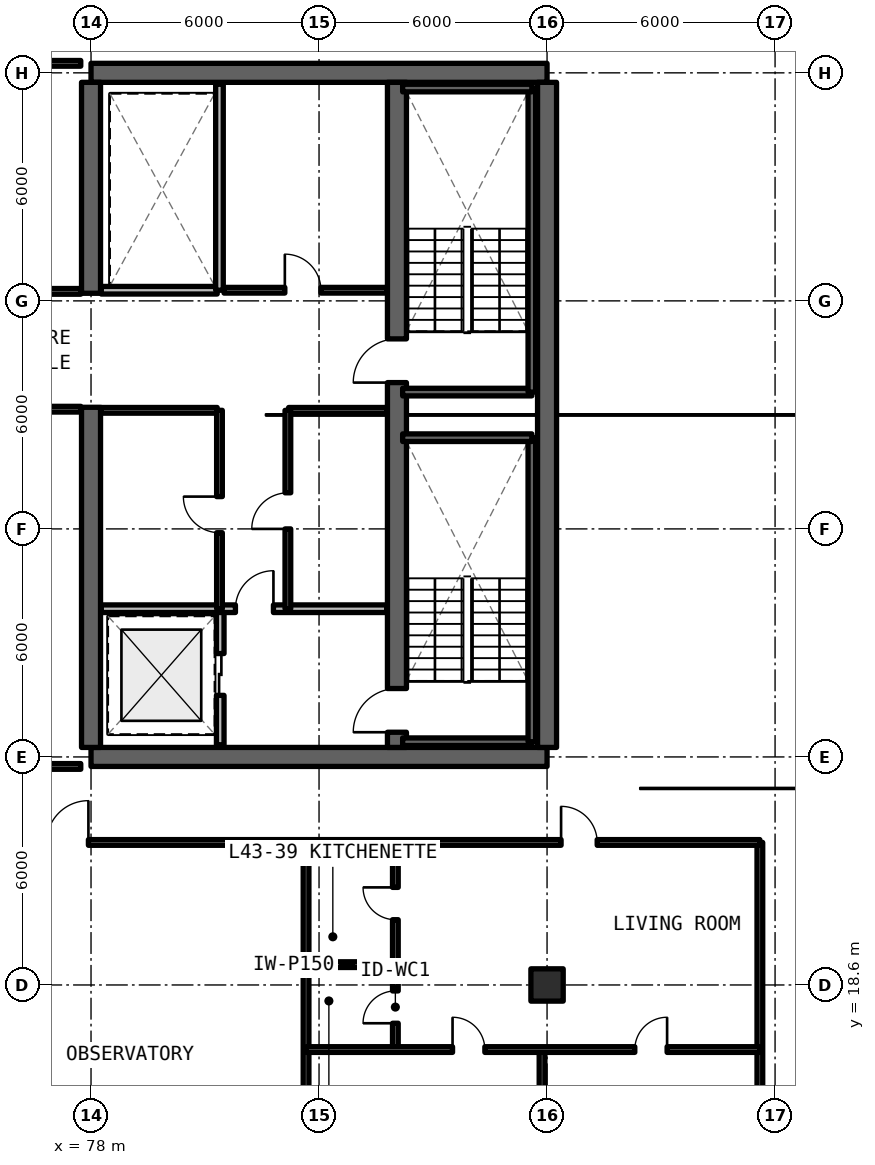
"""IFC4 building model, lengths in metres.
Left out: names, types, materials, properties, quantities, classifications, styles, units other than length and angle.
Written with IfcOpenShell. Run it as: python <this file> out.ifc"""

import sys

from ifc_helpers import new_model, si_unit, direction, frame, frame_2d, origin, origin_2d, place, context, subcontext, project, spatial, rectangle, extrude, element, fill, save


model = new_model("IFC4")
c1 = context("Model", 3, precision=1e-05, world=origin(), true_north=direction((0.0, 1.0)))
c2 = subcontext(c1, "Body", "Model", "MODEL_VIEW")
j1 = project(units=[si_unit("LENGTHUNIT", "METRE"), si_unit("PLANEANGLEUNIT", "RADIAN")], contexts=[c1])
p1 = place(None, origin())
s1 = spatial("IfcSite", under=j1, at=p1, CompositionType="ELEMENT")
p2 = place(p1, origin())
s2 = spatial("IfcBuilding", under=s1, at=p2, CompositionType="ELEMENT")
p3 = place(p2, frame((0.0, 0.0, 155.1)))
s3 = spatial("IfcBuildingStorey", under=s2, at=p3, CompositionType="ELEMENT", Elevation=155.1)
for number, where, z_axis, x_axis in (
    (1, (78.0, 24.6, 0.0), (0.0, 0.0, 1.0), (1.0, 0.0, 0.0)),
    (2, (90.0, 42.6, 0.0), (0.0, 0.0, 1.0), (-1.0, 0.0, 0.0)),
):
    element("IfcWall", number, at=place(p3, frame(where, z_axis=z_axis, x_axis=x_axis)), inside=s3, PredefinedType="SHEAR", context=c2, shape_type="SweptSolid", body=[
        extrude(rectangle(XDim=12.0, YDim=0.5, at=frame_2d((6.0, 0.0))), origin(), (0.0, 0.0, 1.0), 3.3),
    ])
p4 = place(p3, frame((90.0, 24.85, 0.0), z_axis=(0.0, 0.0, 1.0), x_axis=(0.0, 1.0, 0.0)))
e3 = element("IfcWall", 3, at=p4, inside=s3, PredefinedType="SHEAR", context=c2, shape_type="SweptSolid", body=[
    extrude(rectangle(XDim=17.5, YDim=0.5, at=frame_2d((8.75, 0.0))), origin(), (0.0, 0.0, 1.0), 3.3),
])
p5 = place(p3, frame((78.0, 24.85, 0.0), z_axis=(0.0, 0.0, 1.0), x_axis=(0.0, 1.0, 0.0)))
e4 = element("IfcWall", 4, at=p5, inside=s3, PredefinedType="SHEAR", context=c2, shape_type="SweptSolid", body=[
    extrude(rectangle(XDim=8.95, YDim=0.5, at=frame_2d((4.475, 0.0))), origin(), (0.0, 0.0, 1.0), 3.3),
])
p6 = place(p3, frame((78.0, 36.8, 0.0), z_axis=(0.0, 0.0, 1.0), x_axis=(0.0, 1.0, 0.0)))
e5 = element("IfcWall", 5, at=p6, inside=s3, PredefinedType="SHEAR", context=c2, shape_type="SweptSolid", body=[
    extrude(rectangle(XDim=5.55, YDim=0.5, at=frame_2d((2.775, 0.0))), origin(), (0.0, 0.0, 1.0), 3.3),
])
p7 = place(p3, frame((86.05, 24.85, 0.0), z_axis=(0.0, 0.0, 1.0), x_axis=(0.0, 1.0, 0.0)))
e6 = element("IfcWall", 6, at=p7, inside=s3, PredefinedType="SHEAR", context=c2, shape_type="SweptSolid", body=[
    extrude(rectangle(XDim=17.5, YDim=0.5, at=frame_2d((8.75, 0.0))), origin(), (0.0, 0.0, 1.0), 3.3),
])
p8 = place(p7, frame((0.4, 0.0, 0.0)))
e7 = element("IfcOpeningElement", 7, at=p8, cuts=e6, PredefinedType="OPENING", context=c2, shape_type="SweptSolid", body=[
    extrude(rectangle(XDim=1.15, YDim=2.15, at=frame_2d((0.575, 1.075))), frame((0.0, 0.26, 0.0), z_axis=(0.0, -1.0, 0.0), x_axis=(1.0, 0.0, 0.0)), (0.0, 0.0, 1.0), 0.52),
])
p9 = place(p7, frame((9.6, 0.0, 0.0)))
e8 = element("IfcOpeningElement", 8, at=p9, cuts=e6, PredefinedType="OPENING", context=c2, shape_type="SweptSolid", body=[
    extrude(rectangle(XDim=1.15, YDim=2.15, at=frame_2d((0.575, 1.075))), frame((0.0, 0.26, 0.0), z_axis=(0.0, -1.0, 0.0), x_axis=(1.0, 0.0, 0.0)), (0.0, 0.0, 1.0), 0.52),
])
p10 = place(p3, frame((90.0, 18.6, 0.0), z_axis=(0.0, 0.0, 1.0), x_axis=(1.0, 0.0, 0.0)))
e9 = element("IfcColumn", 9, at=p10, inside=s3, PredefinedType="COLUMN", context=c2, shape_type="SweptSolid", body=[
    extrude(rectangle(XDim=0.85, YDim=0.85, at=origin_2d()), origin(), (0.0, 0.0, 1.0), 3.3),
])
p11 = place(p3, frame((95.748, 12.025, 0.0), z_axis=(0.0, 0.0, 1.0), x_axis=(0.70708586489, 0.707127696864, 0.0)))
e10 = element("IfcWall", 10, at=p11, inside=s3, PredefinedType="SOLIDWALL", context=c2, shape_type="SweptSolid", body=[
    extrude(rectangle(XDim=5.836, YDim=0.25, at=frame_2d((2.918, 0.0))), origin(), (0.0, 0.0, 1.0), 3.08),
])
p12 = place(p11, frame((1.218, 0.0, 0.78)))
e11 = element("IfcOpeningElement", 11, at=p12, cuts=e10, PredefinedType="OPENING", context=c2, shape_type="SweptSolid", body=[
    extrude(rectangle(XDim=3.4, YDim=1.66, at=frame_2d((1.7, 0.83))), frame((0.0, 0.135, 0.0), z_axis=(0.0, -1.0, 0.0), x_axis=(1.0, 0.0, 0.0)), (0.0, 0.0, 1.0), 0.27),
])
p13 = place(p3, frame((81.4, 24.92, 0.0), z_axis=(0.0, 0.0, 1.0), x_axis=(0.0, 1.0, 0.0)))
e12 = element("IfcWall", 12, at=p13, inside=s3, PredefinedType="SOLIDWALL", context=c2, shape_type="SweptSolid", body=[
    extrude(rectangle(XDim=3.58, YDim=0.2, at=frame_2d((1.79, 0.0))), origin(), (0.0, 0.0, 1.0), 2.35),
])
p14 = place(p13, frame((1.3, 0.0, 0.0)))
e13 = element("IfcOpeningElement", 13, at=p14, cuts=e12, PredefinedType="OPENING", context=c2, shape_type="SweptSolid", body=[
    extrude(rectangle(XDim=1.1, YDim=2.2, at=frame_2d((0.55, 1.1))), frame((0.0, 0.11, 0.0), z_axis=(0.0, -1.0, 0.0), x_axis=(1.0, 0.0, 0.0)), (0.0, 0.0, 1.0), 0.22),
])
p15 = place(p3, frame((78.27, 28.5, 0.0), z_axis=(0.0, 0.0, 1.0), x_axis=(1.0, 0.0, 0.0)))
e14 = element("IfcWall", 14, at=p15, inside=s3, PredefinedType="SOLIDWALL", context=c2, shape_type="SweptSolid", body=[
    extrude(rectangle(XDim=7.51, YDim=0.2, at=frame_2d((3.755, 0.0))), origin(), (0.0, 0.0, 1.0), 2.35),
])
p16 = place(p15, frame((3.53, 0.0, 0.0)))
e15 = element("IfcOpeningElement", 15, at=p16, cuts=e14, PredefinedType="OPENING", context=c2, shape_type="SweptSolid", body=[
    extrude(rectangle(XDim=1.0, YDim=2.15, at=frame_2d((0.5, 1.075))), frame((0.0, 0.11, 0.0), z_axis=(0.0, -1.0, 0.0), x_axis=(1.0, 0.0, 0.0)), (0.0, 0.0, 1.0), 0.22),
])
p17 = place(p3, frame((83.2, 33.72, 0.0), z_axis=(0.0, 0.0, 1.0), x_axis=(1.0, 0.0, 0.0)))
e16 = element("IfcWall", 16, at=p17, inside=s3, PredefinedType="SOLIDWALL", context=c2, shape_type="SweptSolid", body=[
    extrude(rectangle(XDim=2.58, YDim=0.15, at=frame_2d((1.29, 0.0))), origin(), (0.0, 0.0, 1.0), 2.35),
])
p18 = place(p3, frame((83.18, 28.5, 0.0), z_axis=(0.0, 0.0, 1.0), x_axis=(0.0, 1.0, 0.0)))
e17 = element("IfcWall", 17, at=p18, inside=s3, PredefinedType="SOLIDWALL", context=c2, shape_type="SweptSolid", body=[
    extrude(rectangle(XDim=5.22, YDim=0.15, at=frame_2d((2.61, 0.0))), origin(), (0.0, 0.0, 1.0), 2.35),
])
p19 = place(p18, frame((2.1, 0.0, 0.0)))
e18 = element("IfcOpeningElement", 18, at=p19, cuts=e17, PredefinedType="OPENING", context=c2, shape_type="SweptSolid", body=[
    extrude(rectangle(XDim=0.95, YDim=2.15, at=frame_2d((0.475, 1.075))), frame((0.0, 0.085, 0.0), z_axis=(0.0, -1.0, 0.0), x_axis=(1.0, 0.0, 0.0)), (0.0, 0.0, 1.0), 0.17),
])
p20 = place(p3, frame((78.27, 33.72, 0.0), z_axis=(0.0, 0.0, 1.0), x_axis=(1.0, 0.0, 0.0)))
e19 = element("IfcWall", 19, at=p20, inside=s3, PredefinedType="SOLIDWALL", context=c2, shape_type="SweptSolid", body=[
    extrude(rectangle(XDim=3.05, YDim=0.15, at=frame_2d((1.525, 0.0))), origin(), (0.0, 0.0, 1.0), 2.35),
])
p21 = place(p3, frame((81.38, 28.5, 0.0), z_axis=(0.0, 0.0, 1.0), x_axis=(0.0, 1.0, 0.0)))
e20 = element("IfcWall", 20, at=p21, inside=s3, PredefinedType="SOLIDWALL", context=c2, shape_type="SweptSolid", body=[
    extrude(rectangle(XDim=5.22, YDim=0.15, at=frame_2d((2.61, 0.0))), origin(), (0.0, 0.0, 1.0), 2.35),
])
p22 = place(p21, frame((2.0, 0.0, 0.0)))
e21 = element("IfcOpeningElement", 21, at=p22, cuts=e20, PredefinedType="OPENING", context=c2, shape_type="SweptSolid", body=[
    extrude(rectangle(XDim=0.95, YDim=2.15, at=frame_2d((0.475, 1.075))), frame((0.0, 0.085, 0.0), z_axis=(0.0, -1.0, 0.0), x_axis=(1.0, 0.0, 0.0)), (0.0, 0.0, 1.0), 0.17),
])
p23 = place(p3, frame((81.5, 36.88, 0.0), z_axis=(0.0, 0.0, 1.0), x_axis=(1.0, 0.0, 0.0)))
e22 = element("IfcWall", 22, at=p23, inside=s3, PredefinedType="SOLIDWALL", context=c2, shape_type="SweptSolid", body=[
    extrude(rectangle(XDim=4.28, YDim=0.15, at=frame_2d((2.14, 0.0))), origin(), (0.0, 0.0, 1.0), 2.35),
])
p24 = place(p23, frame((1.6, 0.0, 0.0)))
e23 = element("IfcOpeningElement", 23, at=p24, cuts=e22, PredefinedType="OPENING", context=c2, shape_type="SweptSolid", body=[
    extrude(rectangle(XDim=0.95, YDim=2.15, at=frame_2d((0.475, 1.075))), frame((0.0, 0.085, 0.0), z_axis=(0.0, -1.0, 0.0), x_axis=(1.0, 0.0, 0.0)), (0.0, 0.0, 1.0), 0.17),
])
p25 = place(p3, frame((78.27, 36.88, 0.0), z_axis=(0.0, 0.0, 1.0), x_axis=(1.0, 0.0, 0.0)))
e24 = element("IfcWall", 24, at=p25, inside=s3, PredefinedType="SOLIDWALL", context=c2, shape_type="SweptSolid", body=[
    extrude(rectangle(XDim=3.05, YDim=0.2, at=frame_2d((1.525, 0.0))), origin(), (0.0, 0.0, 1.0), 2.35),
])
p26 = place(p3, frame((81.38, 36.88, 0.0), z_axis=(0.0, 0.0, 1.0), x_axis=(0.0, 1.0, 0.0)))
e25 = element("IfcWall", 25, at=p26, inside=s3, PredefinedType="SOLIDWALL", context=c2, shape_type="SweptSolid", body=[
    extrude(rectangle(XDim=5.42, YDim=0.2, at=frame_2d((2.71, 0.0))), origin(), (0.0, 0.0, 1.0), 2.35),
])
p27 = place(p3, frame((69.85, 24.35, 0.0), z_axis=(0.0, 0.0, 1.0), x_axis=(1.0, 0.0, 0.0)))
e26 = element("IfcWall", 26, at=p27, inside=s3, PredefinedType="SOLIDWALL", context=c2, shape_type="SweptSolid", body=[
    extrude(rectangle(XDim=7.88, YDim=0.15, at=frame_2d((3.94, 0.0))), origin(), (0.0, 0.0, 1.0), 2.35),
])
p28 = place(p3, frame((69.85, 33.75, 0.0), z_axis=(0.0, 0.0, 1.0), x_axis=(1.0, 0.0, 0.0)))
e27 = element("IfcWall", 27, at=p28, inside=s3, PredefinedType="SOLIDWALL", context=c2, shape_type="SweptSolid", body=[
    extrude(rectangle(XDim=7.88, YDim=0.15, at=frame_2d((3.94, 0.0))), origin(), (0.0, 0.0, 1.0), 2.35),
])
p29 = place(p28, frame((3.465, 0.0, 0.0)))
e28 = element("IfcOpeningElement", 28, at=p29, cuts=e27, PredefinedType="OPENING", context=c2, shape_type="SweptSolid", body=[
    extrude(rectangle(XDim=0.95, YDim=2.15, at=frame_2d((0.475, 1.075))), frame((0.0, 0.085, 0.0), z_axis=(0.0, -1.0, 0.0), x_axis=(1.0, 0.0, 0.0)), (0.0, 0.0, 1.0), 0.17),
])
p30 = place(p3, frame((69.85, 36.85, 0.0), z_axis=(0.0, 0.0, 1.0), x_axis=(1.0, 0.0, 0.0)))
e29 = element("IfcWall", 29, at=p30, inside=s3, PredefinedType="SOLIDWALL", context=c2, shape_type="SweptSolid", body=[
    extrude(rectangle(XDim=7.88, YDim=0.15, at=frame_2d((3.94, 0.0))), origin(), (0.0, 0.0, 1.0), 2.35),
])
p31 = place(p30, frame((3.465, 0.0, 0.0)))
e30 = element("IfcOpeningElement", 30, at=p31, cuts=e29, PredefinedType="OPENING", context=c2, shape_type="SweptSolid", body=[
    extrude(rectangle(XDim=0.95, YDim=2.15, at=frame_2d((0.475, 1.075))), frame((0.0, 0.085, 0.0), z_axis=(0.0, -1.0, 0.0), x_axis=(1.0, 0.0, 0.0)), (0.0, 0.0, 1.0), 0.17),
])
p32 = place(p3, frame((69.85, 42.85, 0.0), z_axis=(0.0, 0.0, 1.0), x_axis=(1.0, 0.0, 0.0)))
e31 = element("IfcWall", 31, at=p32, inside=s3, PredefinedType="SOLIDWALL", context=c2, shape_type="SweptSolid", body=[
    extrude(rectangle(XDim=7.88, YDim=0.15, at=frame_2d((3.94, 0.0))), origin(), (0.0, 0.0, 1.0), 2.35),
])
for number, where, z_axis, x_axis in (
    (32, (95.6, 12.15, 0.0), (0.0, 0.0, 1.0), (0.0, 1.0, 0.0)),
    (33, (83.658, 12.15, 0.0), (0.0, 0.0, 1.0), (0.0, 1.0, 0.0)),
):
    element("IfcWall", number, at=place(p3, frame(where, z_axis=z_axis, x_axis=x_axis)), inside=s3, PredefinedType="SOLIDWALL", context=c2, shape_type="SweptSolid", body=[
        extrude(rectangle(XDim=10.2, YDim=0.15, at=frame_2d((5.1, 0.0))), origin(), (0.0, 0.0, 1.0), 2.35),
    ])
p33 = place(p3, frame((71.104, 22.35, 0.0), z_axis=(0.0, 0.0, 1.0), x_axis=(1.0, 0.0, 0.0)))
e34 = element("IfcWall", 34, at=p33, inside=s3, PredefinedType="SOLIDWALL", context=c2, shape_type="SweptSolid", body=[
    extrude(rectangle(XDim=12.554, YDim=0.15, at=frame_2d((6.277, 0.0))), origin(), (0.0, 0.0, 1.0), 2.35),
])
p34 = place(p33, frame((5.727, 0.0, 0.0)))
e35 = element("IfcOpeningElement", 35, at=p34, cuts=e34, PredefinedType="OPENING", context=c2, shape_type="SweptSolid", body=[
    extrude(rectangle(XDim=1.1, YDim=2.15, at=frame_2d((0.55, 1.075))), frame((0.0, 0.085, 0.0), z_axis=(0.0, -1.0, 0.0), x_axis=(1.0, 0.0, 0.0)), (0.0, 0.0, 1.0), 0.17),
])
p35 = place(p3, frame((83.658, 19.135, 0.0), z_axis=(0.0, 0.0, 1.0), x_axis=(1.0, 0.0, 0.0)))
e36 = element("IfcWall", 36, at=p35, inside=s3, PredefinedType="PARTITIONING", context=c2, shape_type="SweptSolid", body=[
    extrude(rectangle(XDim=2.35, YDim=0.15, at=frame_2d((1.175, 0.0))), origin(), (0.0, 0.0, 1.0), 2.35),
])
p36 = place(p3, frame((86.008, 16.901, 0.0), z_axis=(0.0, 0.0, 1.0), x_axis=(0.0, 1.0, 0.0)))
e37 = element("IfcWall", 37, at=p36, inside=s3, PredefinedType="PARTITIONING", context=c2, shape_type="SweptSolid", body=[
    extrude(rectangle(XDim=5.449, YDim=0.15, at=frame_2d((2.725, 0.0))), origin(), (0.0, 0.0, 1.0), 2.35),
])
p37 = place(p36, frame((0.692, 0.0, 0.0)))
e38 = element("IfcOpeningElement", 38, at=p37, cuts=e37, PredefinedType="OPENING", context=c2, shape_type="SweptSolid", body=[
    extrude(rectangle(XDim=0.85, YDim=2.1, at=frame_2d((0.425, 1.05))), frame((0.0, 0.085, 0.0), z_axis=(0.0, -1.0, 0.0), x_axis=(1.0, 0.0, 0.0)), (0.0, 0.0, 1.0), 0.17),
])
p38 = place(p36, frame((3.417, 0.0, 0.0)))
e39 = element("IfcOpeningElement", 39, at=p38, cuts=e37, PredefinedType="OPENING", context=c2, shape_type="SweptSolid", body=[
    extrude(rectangle(XDim=0.85, YDim=2.1, at=frame_2d((0.425, 1.05))), frame((0.0, 0.085, 0.0), z_axis=(0.0, -1.0, 0.0), x_axis=(1.0, 0.0, 0.0)), (0.0, 0.0, 1.0), 0.17),
])
p39 = place(p3, frame((89.868, 12.15, 0.0), z_axis=(0.0, 0.0, 1.0), x_axis=(0.0, 1.0, 0.0)))
e40 = element("IfcWall", 40, at=p39, inside=s3, PredefinedType="PARTITIONING", context=c2, shape_type="SweptSolid", body=[
    extrude(rectangle(XDim=4.751, YDim=0.15, at=frame_2d((2.375, 0.0))), origin(), (0.0, 0.0, 1.0), 2.35),
])
p40 = place(p3, frame((83.658, 16.901, 0.0), z_axis=(0.0, 0.0, 1.0), x_axis=(1.0, 0.0, 0.0)))
e41 = element("IfcWall", 41, at=p40, inside=s3, PredefinedType="PARTITIONING", context=c2, shape_type="SweptSolid", body=[
    extrude(rectangle(XDim=11.942, YDim=0.15, at=frame_2d((5.971, 0.0))), origin(), (0.0, 0.0, 1.0), 2.35),
])
p41 = place(p40, frame((3.855, 0.0, 0.0)))
e42 = element("IfcOpeningElement", 42, at=p41, cuts=e41, PredefinedType="OPENING", context=c2, shape_type="SweptSolid", body=[
    extrude(rectangle(XDim=0.85, YDim=2.1, at=frame_2d((0.425, 1.05))), frame((0.0, 0.085, 0.0), z_axis=(0.0, -1.0, 0.0), x_axis=(1.0, 0.0, 0.0)), (0.0, 0.0, 1.0), 0.17),
])
p42 = place(p40, frame((8.651, 0.0, 0.0)))
e43 = element("IfcOpeningElement", 43, at=p42, cuts=e41, PredefinedType="OPENING", context=c2, shape_type="SweptSolid", body=[
    extrude(rectangle(XDim=0.85, YDim=2.1, at=frame_2d((0.425, 1.05))), frame((0.0, 0.085, 0.0), z_axis=(0.0, -1.0, 0.0), x_axis=(1.0, 0.0, 0.0)), (0.0, 0.0, 1.0), 0.17),
])
p43 = place(p3, frame((83.658, 22.35, 0.0), z_axis=(0.0, 0.0, 1.0), x_axis=(1.0, 0.0, 0.0)))
e44 = element("IfcWall", 44, at=p43, inside=s3, PredefinedType="SOLIDWALL", context=c2, shape_type="SweptSolid", body=[
    extrude(rectangle(XDim=11.942, YDim=0.15, at=frame_2d((5.971, 0.0))), origin(), (0.0, 0.0, 1.0), 2.35),
])
p44 = place(p43, frame((6.711, 0.0, 0.0)))
e45 = element("IfcOpeningElement", 45, at=p44, cuts=e44, PredefinedType="OPENING", context=c2, shape_type="SweptSolid", body=[
    extrude(rectangle(XDim=0.95, YDim=2.15, at=frame_2d((0.475, 1.075))), frame((0.0, 0.085, 0.0), z_axis=(0.0, -1.0, 0.0), x_axis=(1.0, 0.0, 0.0)), (0.0, 0.0, 1.0), 0.17),
])
p45 = place(p3, frame((86.2, 25.0, 0.0), z_axis=(0.0, 0.0, 1.0), x_axis=(1.0, 0.0, 0.0)))
e46 = element("IfcWall", 46, at=p45, inside=s3, PredefinedType="SOLIDWALL", context=c2, shape_type="SweptSolid", body=[
    extrude(rectangle(XDim=3.4, YDim=0.2, at=frame_2d((1.7, 0.0))), origin(), (0.0, 0.0, 1.0), 3.3),
])
p46 = place(p3, frame((89.6, 25.0, 0.0), z_axis=(0.0, 0.0, 1.0), x_axis=(0.0, 1.0, 0.0)))
e47 = element("IfcWall", 47, at=p46, inside=s3, PredefinedType="SOLIDWALL", context=c2, shape_type="SweptSolid", body=[
    extrude(rectangle(XDim=8.0, YDim=0.2, at=frame_2d((4.0, 0.0))), origin(), (0.0, 0.0, 1.0), 3.3),
])
for number, where, z_axis, x_axis in (
    (48, (89.6, 33.0, 0.0), (0.0, 0.0, 1.0), (-1.0, 0.0, 0.0)),
    (49, (86.2, 34.2, 0.0), (0.0, 0.0, 1.0), (1.0, 0.0, 0.0)),
):
    element("IfcWall", number, at=place(p3, frame(where, z_axis=z_axis, x_axis=x_axis)), inside=s3, PredefinedType="SOLIDWALL", context=c2, shape_type="SweptSolid", body=[
        extrude(rectangle(XDim=3.4, YDim=0.2, at=frame_2d((1.7, 0.0))), origin(), (0.0, 0.0, 1.0), 3.3),
    ])
p47 = place(p3, frame((89.6, 34.2, 0.0), z_axis=(0.0, 0.0, 1.0), x_axis=(0.0, 1.0, 0.0)))
e50 = element("IfcWall", 50, at=p47, inside=s3, PredefinedType="SOLIDWALL", context=c2, shape_type="SweptSolid", body=[
    extrude(rectangle(XDim=8.0, YDim=0.2, at=frame_2d((4.0, 0.0))), origin(), (0.0, 0.0, 1.0), 3.3),
])
p48 = place(p3, frame((89.6, 42.2, 0.0), z_axis=(0.0, 0.0, 1.0), x_axis=(-1.0, 0.0, 0.0)))
e51 = element("IfcWall", 51, at=p48, inside=s3, PredefinedType="SOLIDWALL", context=c2, shape_type="SweptSolid", body=[
    extrude(rectangle(XDim=3.4, YDim=0.2, at=frame_2d((1.7, 0.0))), origin(), (0.0, 0.0, 1.0), 3.3),
])
p49 = place(p14, origin())
e52 = element("IfcDoor", 52, at=p49, inside=s3, OperationType="SLIDING_TO_LEFT", PredefinedType="DOOR", context=c2, shape_type="SweptSolid", body=[
    extrude(rectangle(XDim=1.1, YDim=2.2, at=frame_2d((0.55, 1.1))), frame((0.0, 0.025, 0.0), z_axis=(0.0, -1.0, 0.0), x_axis=(1.0, 0.0, 0.0)), (0.0, 0.0, 1.0), 0.05),
])
fill(e13, e52)
p50 = place(p16, origin())
e53 = element("IfcDoor", 53, at=p50, inside=s3, OperationType="SINGLE_SWING_RIGHT", PredefinedType="DOOR", context=c2, shape_type="SweptSolid", body=[
    extrude(rectangle(XDim=1.0, YDim=2.15, at=frame_2d((0.5, 1.075))), frame((0.0, 0.025, 0.0), z_axis=(0.0, -1.0, 0.0), x_axis=(1.0, 0.0, 0.0)), (0.0, 0.0, 1.0), 0.05),
])
fill(e15, e53)
p51 = place(p19, origin())
e54 = element("IfcDoor", 54, at=p51, inside=s3, OperationType="SINGLE_SWING_LEFT", PredefinedType="DOOR", context=c2, shape_type="SweptSolid", body=[
    extrude(rectangle(XDim=0.95, YDim=2.15, at=frame_2d((0.475, 1.075))), frame((0.0, 0.025, 0.0), z_axis=(0.0, -1.0, 0.0), x_axis=(1.0, 0.0, 0.0)), (0.0, 0.0, 1.0), 0.05),
])
fill(e18, e54)
p52 = place(p22, origin())
e55 = element("IfcDoor", 55, at=p52, inside=s3, OperationType="SINGLE_SWING_RIGHT", PredefinedType="DOOR", context=c2, shape_type="SweptSolid", body=[
    extrude(rectangle(XDim=0.95, YDim=2.15, at=frame_2d((0.475, 1.075))), frame((0.0, 0.025, 0.0), z_axis=(0.0, -1.0, 0.0), x_axis=(1.0, 0.0, 0.0)), (0.0, 0.0, 1.0), 0.05),
])
fill(e21, e55)
p53 = place(p24, origin())
e56 = element("IfcDoor", 56, at=p53, inside=s3, OperationType="SINGLE_SWING_LEFT", PredefinedType="DOOR", context=c2, shape_type="SweptSolid", body=[
    extrude(rectangle(XDim=0.95, YDim=2.15, at=frame_2d((0.475, 1.075))), frame((0.0, 0.025, 0.0), z_axis=(0.0, -1.0, 0.0), x_axis=(1.0, 0.0, 0.0)), (0.0, 0.0, 1.0), 0.05),
])
fill(e23, e56)
p54 = place(p34, origin())
e57 = element("IfcDoor", 57, at=p54, inside=s3, OperationType="SINGLE_SWING_RIGHT", PredefinedType="DOOR", context=c2, shape_type="SweptSolid", body=[
    extrude(rectangle(XDim=1.1, YDim=2.15, at=frame_2d((0.55, 1.075))), frame((0.0, 0.025, 0.0), z_axis=(0.0, -1.0, 0.0), x_axis=(1.0, 0.0, 0.0)), (0.0, 0.0, 1.0), 0.05),
])
fill(e35, e57)
p55 = place(p37, origin())
e58 = element("IfcDoor", 58, at=p55, inside=s3, OperationType="SINGLE_SWING_LEFT", PredefinedType="DOOR", context=c2, shape_type="SweptSolid", body=[
    extrude(rectangle(XDim=0.85, YDim=2.1, at=frame_2d((0.425, 1.05))), frame((0.0, 0.025, 0.0), z_axis=(0.0, -1.0, 0.0), x_axis=(1.0, 0.0, 0.0)), (0.0, 0.0, 1.0), 0.05),
])
fill(e38, e58)
p56 = place(p38, origin())
e59 = element("IfcDoor", 59, at=p56, inside=s3, OperationType="SINGLE_SWING_RIGHT", PredefinedType="DOOR", context=c2, shape_type="SweptSolid", body=[
    extrude(rectangle(XDim=0.85, YDim=2.1, at=frame_2d((0.425, 1.05))), frame((0.0, 0.025, 0.0), z_axis=(0.0, -1.0, 0.0), x_axis=(1.0, 0.0, 0.0)), (0.0, 0.0, 1.0), 0.05),
])
fill(e39, e59)
p57 = place(p41, origin())
e60 = element("IfcDoor", 60, at=p57, inside=s3, OperationType="SINGLE_SWING_LEFT", PredefinedType="DOOR", context=c2, shape_type="SweptSolid", body=[
    extrude(rectangle(XDim=0.85, YDim=2.1, at=frame_2d((0.425, 1.05))), frame((0.0, 0.025, 0.0), z_axis=(0.0, -1.0, 0.0), x_axis=(1.0, 0.0, 0.0)), (0.0, 0.0, 1.0), 0.05),
])
fill(e42, e60)
p58 = place(p42, origin())
e61 = element("IfcDoor", 61, at=p58, inside=s3, OperationType="SINGLE_SWING_RIGHT", PredefinedType="DOOR", context=c2, shape_type="SweptSolid", body=[
    extrude(rectangle(XDim=0.85, YDim=2.1, at=frame_2d((0.425, 1.05))), frame((0.0, 0.025, 0.0), z_axis=(0.0, -1.0, 0.0), x_axis=(1.0, 0.0, 0.0)), (0.0, 0.0, 1.0), 0.05),
])
fill(e43, e61)
p59 = place(p44, origin())
e62 = element("IfcDoor", 62, at=p59, inside=s3, OperationType="SINGLE_SWING_LEFT", PredefinedType="DOOR", context=c2, shape_type="SweptSolid", body=[
    extrude(rectangle(XDim=0.95, YDim=2.15, at=frame_2d((0.475, 1.075))), frame((0.0, 0.025, 0.0), z_axis=(0.0, -1.0, 0.0), x_axis=(1.0, 0.0, 0.0)), (0.0, 0.0, 1.0), 0.05),
])
fill(e45, e62)
p60 = place(p8, origin())
e63 = element("IfcDoor", 63, at=p60, inside=s3, OperationType="SINGLE_SWING_RIGHT", PredefinedType="DOOR", context=c2, shape_type="SweptSolid", body=[
    extrude(rectangle(XDim=1.15, YDim=2.15, at=frame_2d((0.575, 1.075))), frame((0.0, 0.025, 0.0), z_axis=(0.0, -1.0, 0.0), x_axis=(1.0, 0.0, 0.0)), (0.0, 0.0, 1.0), 0.05),
])
fill(e7, e63)
p61 = place(p9, origin())
e64 = element("IfcDoor", 64, at=p61, inside=s3, OperationType="SINGLE_SWING_LEFT", PredefinedType="DOOR", context=c2, shape_type="SweptSolid", body=[
    extrude(rectangle(XDim=1.15, YDim=2.15, at=frame_2d((0.575, 1.075))), frame((0.0, 0.025, 0.0), z_axis=(0.0, -1.0, 0.0), x_axis=(1.0, 0.0, 0.0)), (0.0, 0.0, 1.0), 0.05),
])
fill(e8, e64)
save(model, sys.argv[1])
